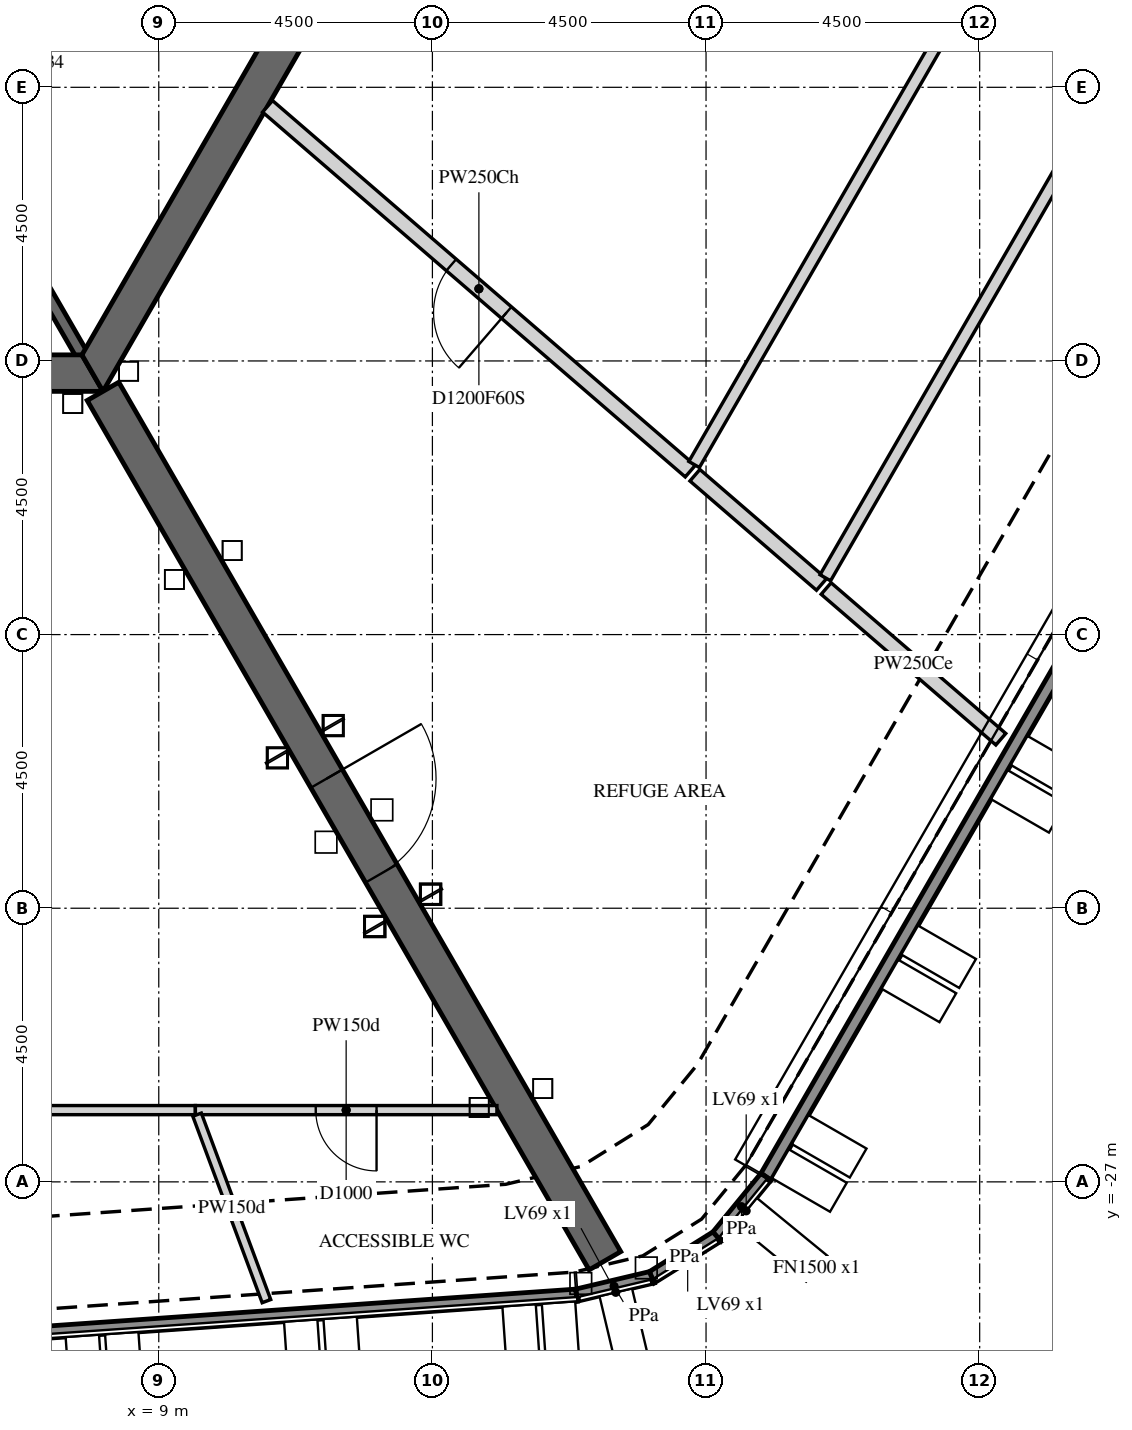
"""IFC4 building model, lengths in metres.
Left out: names, types, materials, properties, quantities, classifications, styles, units other than length and angle.
Written with IfcOpenShell. Run it as: python <this file> out.ifc"""

import sys

from ifc_helpers import new_model, si_unit, direction, frame, frame_2d, origin, place, context, subcontext, project, spatial, polyline, rectangle, outline, extrude, element, fill, save


model = new_model("IFC4")
c1 = context("Model", 3, precision=1e-05, world=origin(), true_north=direction((0.0, 1.0)))
c2 = subcontext(c1, "Body", "Model", "MODEL_VIEW")
j1 = project(units=[si_unit("LENGTHUNIT", "METRE"), si_unit("PLANEANGLEUNIT", "RADIAN")], contexts=[c1])
p1 = place(None, origin())
s1 = spatial("IfcSite", under=j1, at=p1, CompositionType="ELEMENT")
p2 = place(p1, origin())
s2 = spatial("IfcBuilding", under=s1, at=p2, CompositionType="ELEMENT")
p3 = place(p2, frame((0.0, 0.0, 146.7)))
s3 = spatial("IfcBuildingStorey", under=s2, at=p3, CompositionType="ELEMENT", Elevation=146.7)
p4 = place(p3, frame((34.013, -0.888, 5.7), z_axis=(0.0, 0.0, 1.0), x_axis=(-0.499996465352, -0.866027444505, 0.0)))
e1 = element("IfcWall", 1, at=p4, inside=s3, PredefinedType="PARAPET", context=c2, shape_type="SweptSolid", body=[
    extrude(outline(polyline([(0.009, -0.1), (30.045, -0.1), (30.062, 0.1), (-0.009, 0.1), (0.009, -0.1)])), origin(), (0.0, 0.0, 1.0), 1.1),
])
p5 = place(p3, frame((18.986, -26.915, 5.7), z_axis=(0.0, 0.0, 1.0), x_axis=(-0.63393735888, -0.773384396673, 0.0)))
e2 = element("IfcWall", 2, at=p5, inside=s3, PredefinedType="PARAPET", context=c2, shape_type="SweptSolid", body=[
    extrude(outline(polyline([(0.008, -0.1), (1.256, -0.1), (1.289, 0.1), (-0.008, 0.1), (0.008, -0.1)])), origin(), (0.0, 0.0, 1.0), 1.1),
])
p6 = place(p3, frame((18.179, -27.9, 5.7), z_axis=(0.0, 0.0, 1.0), x_axis=(-0.847998304005, -0.529998940003, 0.0)))
e3 = element("IfcWall", 3, at=p6, inside=s3, PredefinedType="PARAPET", context=c2, shape_type="SweptSolid", body=[
    extrude(outline(polyline([(0.016, -0.1), (1.248, -0.1), (1.281, 0.1), (-0.016, 0.1), (0.016, -0.1)])), origin(), (0.0, 0.0, 1.0), 1.1),
])
p7 = place(p3, frame((17.107, -28.57, 5.7), z_axis=(0.0, 0.0, 1.0), x_axis=(-0.97305877523, -0.230557194525, 0.0)))
e4 = element("IfcWall", 4, at=p7, inside=s3, PredefinedType="PARAPET", context=c2, shape_type="SweptSolid", body=[
    extrude(outline(polyline([(0.016, -0.1), (1.265, -0.1), (1.281, 0.1), (-0.016, 0.1), (0.016, -0.1)])), origin(), (0.0, 0.0, 1.0), 1.1),
])
p8 = place(p3, frame((15.868, -28.863, 5.7), z_axis=(0.0, 0.0, 1.0), x_axis=(-0.99756405733, -0.069756372641, 0.0)))
e5 = element("IfcWall", 5, at=p8, inside=s3, PredefinedType="PARAPET", context=c2, shape_type="SweptSolid", body=[
    extrude(outline(polyline([(0.008, -0.1), (30.044, -0.1), (30.063, 0.1), (-0.008, 0.1), (0.008, -0.1)])), origin(), (0.0, 0.0, 1.0), 1.1),
])
p9 = place(p3, frame((-7.91, -13.7, -0.3), z_axis=(0.0, 0.0, 1.0), x_axis=(1.0, 0.0, 0.0)))
e6 = element("IfcWall", 6, at=p9, inside=s3, PredefinedType="SHEAR", context=c2, shape_type="SweptSolid", body=[
    extrude(outline(polyline([(-0.173, -0.3), (15.993, -0.3), (15.646, 0.3), (0.173, 0.3), (-0.173, -0.3)])), origin(), (0.0, 0.0, 1.0), 5.8),
])
p10 = place(p9, frame((7.31, 0.0, 0.3)))
e7 = element("IfcOpeningElement", 7, at=p10, cuts=e6, PredefinedType="OPENING", context=c2, shape_type="SweptSolid", body=[
    extrude(rectangle(XDim=1.2, YDim=2.4, at=frame_2d((0.6, 1.2))), frame((0.0, 0.31, 0.0), z_axis=(0.0, -1.0, 0.0), x_axis=(1.0, 0.0, 0.0)), (0.0, 0.0, 1.0), 0.62),
])
p11 = place(p3, frame((7.91, -13.7, -0.3), z_axis=(0.0, 0.0, 1.0), x_axis=(0.499999880136, 0.866025472988, 0.0)))
e8 = element("IfcWall", 8, at=p11, inside=s3, PredefinedType="SHEAR", context=c2, shape_type="SweptSolid", body=[
    extrude(outline(polyline([(-0.173, -0.3), (15.993, -0.3), (15.646, 0.3), (0.173, 0.3), (-0.173, -0.3)])), origin(), (0.0, 0.0, 1.0), 5.8),
])
p12 = place(p11, frame((7.039, 0.0, 0.3)))
e9 = element("IfcOpeningElement", 9, at=p12, cuts=e8, PredefinedType="OPENING", context=c2, shape_type="SweptSolid", body=[
    extrude(rectangle(XDim=1.8, YDim=2.4, at=frame_2d((0.9, 1.2))), frame((0.0, 0.31, 0.0), z_axis=(0.0, -1.0, 0.0), x_axis=(1.0, 0.0, 0.0)), (0.0, 0.0, 1.0), 0.62),
])
p13 = place(p3, frame((8.083, -14.0, -0.3), z_axis=(0.0, 0.0, 1.0), x_axis=(0.499997680643, -0.866026742862, 0.0)))
e10 = element("IfcWall", 10, at=p13, inside=s3, PredefinedType="SHEAR", context=c2, shape_type="SweptSolid", body=[
    extrude(rectangle(XDim=16.509, YDim=0.6, at=frame_2d((8.254, 0.0))), origin(), (0.0, 0.0, 1.0), 5.8),
])
p14 = place(p13, frame((7.354, 0.0, 0.3)))
e11 = element("IfcOpeningElement", 11, at=p14, cuts=e10, PredefinedType="OPENING", context=c2, shape_type="SweptSolid", body=[
    extrude(rectangle(XDim=1.8, YDim=2.4, at=frame_2d((0.9, 1.2))), frame((0.0, 0.31, 0.0), z_axis=(0.0, -1.0, 0.0), x_axis=(1.0, 0.0, 0.0)), (0.0, 0.0, 1.0), 0.62),
])
p15 = place(p3, frame((5.673, -9.825, -0.3), z_axis=(0.0, 0.0, 1.0), x_axis=(0.499995046907, 0.866028263435, 0.0)))
e12 = element("IfcWall", 12, at=p15, inside=s3, PredefinedType="SHEAR", context=c2, shape_type="SweptSolid", body=[
    extrude(outline(polyline([(-0.101, -0.175), (11.446, -0.175), (11.244, 0.175), (0.101, 0.175), (-0.101, -0.175)])), origin(), (0.0, 0.0, 1.0), 5.8),
])
p16 = place(p15, frame((4.801, 0.0, 0.3)))
e13 = element("IfcOpeningElement", 13, at=p16, cuts=e12, PredefinedType="OPENING", context=c2, shape_type="SweptSolid", body=[
    extrude(rectangle(XDim=1.8, YDim=2.4, at=frame_2d((0.9, 1.2))), frame((0.0, 0.185, 0.0), z_axis=(0.0, -1.0, 0.0), x_axis=(1.0, 0.0, 0.0)), (0.0, 0.0, 1.0), 0.37),
])
p17 = place(p3, frame((5.773, -10.0, -0.3), z_axis=(0.0, 0.0, 1.0), x_axis=(0.500038251005, -0.86600331843, 0.0)))
e14 = element("IfcWall", 14, at=p17, inside=s3, PredefinedType="SHEAR", context=c2, shape_type="SweptSolid", body=[
    extrude(rectangle(XDim=3.926, YDim=0.2, at=frame_2d((1.963, 0.0))), origin(), (0.0, 0.0, 1.0), 5.8),
])
p18 = place(p3, frame((9.602, -25.82, 0.0), z_axis=(0.0, 0.0, 1.0), x_axis=(-1.0, 0.0, 0.0)))
e15 = element("IfcWall", 15, at=p18, inside=s3, PredefinedType="PARTITIONING", context=c2, shape_type="SweptSolid", body=[
    extrude(rectangle(XDim=9.061, YDim=0.15, at=frame_2d((4.531, 0.0))), origin(), (0.0, 0.0, 1.0), 5.5),
])
p19 = place(p18, frame((4.031, 0.0, 0.0)))
e16 = element("IfcOpeningElement", 16, at=p19, cuts=e15, PredefinedType="OPENING", context=c2, shape_type="SweptSolid", body=[
    extrude(rectangle(XDim=1.0, YDim=2.1, at=frame_2d((0.5, 1.05))), frame((0.0, 0.085, 0.0), z_axis=(0.0, -1.0, 0.0), x_axis=(1.0, 0.0, 0.0)), (0.0, 0.0, 1.0), 0.17),
])
p20 = place(p3, frame((14.561, -25.82, 0.0), z_axis=(0.0, 0.0, 1.0), x_axis=(-1.0, 0.0, 0.0)))
e17 = element("IfcWall", 17, at=p20, inside=s3, PredefinedType="PARTITIONING", context=c2, shape_type="SweptSolid", body=[
    extrude(rectangle(XDim=4.959, YDim=0.15, at=frame_2d((2.479, 0.0))), origin(), (0.0, 0.0, 1.0), 5.5),
])
p21 = place(p20, frame((1.979, 0.0, 0.0)))
e18 = element("IfcOpeningElement", 18, at=p21, cuts=e17, PredefinedType="OPENING", context=c2, shape_type="SweptSolid", body=[
    extrude(rectangle(XDim=1.0, YDim=2.1, at=frame_2d((0.5, 1.05))), frame((0.0, 0.085, 0.0), z_axis=(0.0, -1.0, 0.0), x_axis=(1.0, 0.0, 0.0)), (0.0, 0.0, 1.0), 0.17),
])
p22 = place(p3, frame((10.771, -28.961, 0.0), z_axis=(0.0, 0.0, 1.0), x_axis=(-0.348701701209, 0.937233761435, 0.0)))
e19 = element("IfcWall", 19, at=p22, inside=s3, PredefinedType="PARTITIONING", context=c2, shape_type="SweptSolid", body=[
    extrude(rectangle(XDim=3.272, YDim=0.15, at=frame_2d((1.636, 0.0))), origin(), (0.0, 0.0, 1.0), 5.5),
])
p23 = place(p3, frame((17.74, -15.313, 0.0), z_axis=(0.0, 0.0, 1.0), x_axis=(-0.756988584599, 0.653428100702, 0.0)))
e20 = element("IfcWall", 20, at=p23, inside=s3, PredefinedType="PARTITIONING", context=c2, shape_type="SweptSolid", body=[
    extrude(rectangle(XDim=9.182, YDim=0.25, at=frame_2d((4.591, 0.0))), origin(), (0.0, 0.0, 1.0), 4.573),
])
p24 = place(p23, frame((3.991, 0.0, 0.0)))
e21 = element("IfcOpeningElement", 21, at=p24, cuts=e20, PredefinedType="OPENING", context=c2, shape_type="SweptSolid", body=[
    extrude(rectangle(XDim=1.2, YDim=2.1, at=frame_2d((0.6, 1.05))), frame((0.0, 0.135, 0.0), z_axis=(0.0, -1.0, 0.0), x_axis=(1.0, 0.0, 0.0)), (0.0, 0.0, 1.0), 0.27),
])
p25 = place(p3, frame((17.804, -15.203, 0.0), z_axis=(0.0, 0.0, 1.0), x_axis=(0.499998136973, 0.866026479401, 0.0)))
e22 = element("IfcWall", 22, at=p25, inside=s3, PredefinedType="PARTITIONING", context=c2, shape_type="SweptSolid", body=[
    extrude(rectangle(XDim=17.555, YDim=0.2, at=frame_2d((8.777, 0.0))), origin(), (0.0, 0.0, 1.0), 5.5),
])
p26 = place(p3, frame((19.898, -17.176, 0.0), z_axis=(0.0, 0.0, 1.0), x_axis=(-0.756944808976, 0.6534788108, 0.0)))
e23 = element("IfcWall", 23, at=p26, inside=s3, PredefinedType="PARTITIONING", context=c2, shape_type="SweptSolid", body=[
    extrude(rectangle(XDim=2.749, YDim=0.25, at=frame_2d((1.375, 0.0))), origin(), (0.0, 0.0, 1.0), 5.5),
])
p27 = place(p3, frame((29.814, 0.0, 0.0), z_axis=(0.0, 0.0, 1.0), x_axis=(-0.499978059593, -0.866038070713, 0.0)))
e24 = element("IfcWall", 24, at=p27, inside=s3, PredefinedType="PARTITIONING", context=c2, shape_type="SweptSolid", body=[
    extrude(rectangle(XDim=19.706, YDim=0.2, at=frame_2d((9.853, 0.0))), origin(), (0.0, 0.0, 1.0), 5.5),
])
p28 = place(p27, frame((9.353, 0.0, 0.0)))
e25 = element("IfcOpeningElement", 25, at=p28, cuts=e24, PredefinedType="OPENING", context=c2, shape_type="SweptSolid", body=[
    extrude(rectangle(XDim=1.0, YDim=2.1, at=frame_2d((0.5, 1.05))), frame((0.0, 0.11, 0.0), z_axis=(0.0, -1.0, 0.0), x_axis=(1.0, 0.0, 0.0)), (0.0, 0.0, 1.0), 0.22),
])
p29 = place(p3, frame((22.847, -19.721, 0.0), z_axis=(0.0, 0.0, 1.0), x_axis=(-0.757131139974, 0.653262915587, 0.0)))
e26 = element("IfcWall", 26, at=p29, inside=s3, PredefinedType="PARTITIONING", context=c2, shape_type="SweptSolid", body=[
    extrude(rectangle(XDim=3.794, YDim=0.25, at=frame_2d((1.897, 0.0))), origin(), (0.0, 0.0, 1.0), 5.5),
])
p30 = place(p14, origin())
e27 = element("IfcDoor", 27, at=p30, inside=s3, OperationType="DOUBLE_DOOR_SINGLE_SWING", PredefinedType="DOOR", context=c2, shape_type="SweptSolid", body=[
    extrude(rectangle(XDim=1.8, YDim=2.4, at=frame_2d((0.9, 1.2))), frame((0.0, 0.025, 0.0), z_axis=(0.0, -1.0, 0.0), x_axis=(1.0, 0.0, 0.0)), (0.0, 0.0, 1.0), 0.05),
])
fill(e11, e27)
p31 = place(p21, origin())
e28 = element("IfcDoor", 28, at=p31, inside=s3, OperationType="SINGLE_SWING_LEFT", PredefinedType="DOOR", context=c2, shape_type="SweptSolid", body=[
    extrude(rectangle(XDim=1.0, YDim=2.1, at=frame_2d((0.5, 1.05))), frame((0.0, 0.025, 0.0), z_axis=(0.0, -1.0, 0.0), x_axis=(1.0, 0.0, 0.0)), (0.0, 0.0, 1.0), 0.05),
])
fill(e18, e28)
p32 = place(p24, origin())
e29 = element("IfcDoor", 29, at=p32, inside=s3, OperationType="SINGLE_SWING_LEFT", PredefinedType="DOOR", context=c2, shape_type="SweptSolid", body=[
    extrude(rectangle(XDim=1.2, YDim=2.1, at=frame_2d((0.6, 1.05))), frame((0.0, 0.025, 0.0), z_axis=(0.0, -1.0, 0.0), x_axis=(1.0, 0.0, 0.0)), (0.0, 0.0, 1.0), 0.05),
])
fill(e21, e29)
save(model, sys.argv[1])
